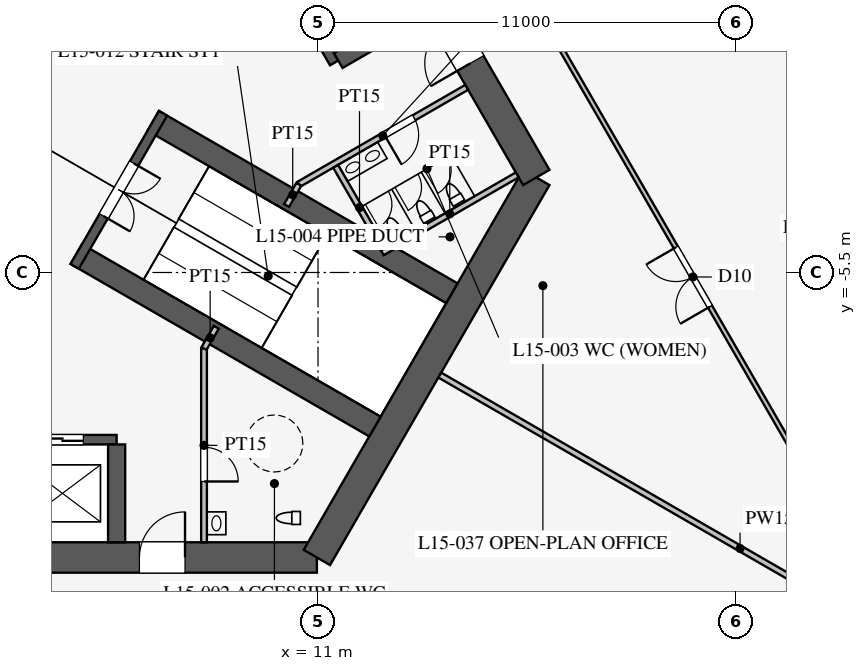
"""IFC4 building model, lengths in metres.
Left out: names, types, materials, properties, quantities, classifications, styles, units other than length and angle.
Written with IfcOpenShell. Run it as: python <this file> out.ifc"""

import sys

from ifc_helpers import new_model, si_unit, direction, frame, frame_2d, origin, place, context, subcontext, project, spatial, rectangle, extrude, element, fill, save


model = new_model("IFC4")
c1 = context("Model", 3, precision=1e-05, world=origin(), true_north=direction((0.0, 1.0)))
c2 = subcontext(c1, "Body", "Model", "MODEL_VIEW")
j1 = project(units=[si_unit("LENGTHUNIT", "METRE"), si_unit("PLANEANGLEUNIT", "RADIAN")], contexts=[c1])
p1 = place(None, origin())
s1 = spatial("IfcSite", under=j1, at=p1, CompositionType="ELEMENT")
p2 = place(p1, origin())
s2 = spatial("IfcBuilding", under=s1, at=p2, CompositionType="ELEMENT")
p3 = place(p2, frame((0.0, 0.0, 66.9)))
s3 = spatial("IfcBuildingStorey", under=s2, at=p3, CompositionType="ELEMENT", Elevation=66.9)
p4 = place(p3, frame((-10.97, -13.0, 0.0), z_axis=(0.0, 0.0, 1.0), x_axis=(1.0, 0.0, 0.0)))
e1 = element("IfcWall", 1, at=p4, inside=s3, PredefinedType="SHEAR", context=c2, shape_type="SweptSolid", body=[
    extrude(rectangle(XDim=21.939, YDim=0.8, at=frame_2d((10.97, 0.0))), origin(), (0.0, 0.0, 1.0), 4.2),
])
p5 = place(p4, frame((17.27, 0.0, 0.0)))
e2 = element("IfcOpeningElement", 2, at=p5, cuts=e1, PredefinedType="OPENING", context=c2, shape_type="SweptSolid", body=[
    extrude(rectangle(XDim=1.2, YDim=2.1, at=frame_2d((0.6, 1.05))), frame((0.0, 0.41, 0.0), z_axis=(0.0, -1.0, 0.0), x_axis=(1.0, 0.0, 0.0)), (0.0, 0.0, 1.0), 0.82),
])
p6 = place(p4, frame((3.47, 0.0, 0.0)))
e3 = element("IfcOpeningElement", 3, at=p6, cuts=e1, PredefinedType="OPENING", context=c2, shape_type="SweptSolid", body=[
    extrude(rectangle(XDim=1.2, YDim=2.1, at=frame_2d((0.6, 1.05))), frame((0.0, 0.41, 0.0), z_axis=(0.0, -1.0, 0.0), x_axis=(1.0, 0.0, 0.0)), (0.0, 0.0, 1.0), 0.82),
])
p7 = place(p3, frame((10.97, -13.0, 0.0), z_axis=(0.0, 0.0, 1.0), x_axis=(0.499995765644, 0.866027848477, 0.0)))
e4 = element("IfcWall", 4, at=p7, inside=s3, PredefinedType="SHEAR", context=c2, shape_type="SweptSolid", body=[
    extrude(rectangle(XDim=11.547, YDim=0.8, at=frame_2d((5.773, 0.0))), origin(), (0.0, 0.0, 1.0), 4.2),
])
p8 = place(p3, frame((16.743, -3.0, 0.0), z_axis=(0.0, 0.0, 1.0), x_axis=(-0.500002442456, 0.866023993627, 0.0)))
e5 = element("IfcWall", 5, at=p8, inside=s3, PredefinedType="SHEAR", context=c2, shape_type="SweptSolid", body=[
    extrude(rectangle(XDim=21.939, YDim=0.8, at=frame_2d((10.97, 0.0))), origin(), (0.0, 0.0, 1.0), 4.2),
])
p9 = place(p8, frame((17.27, 0.0, 0.0)))
e6 = element("IfcOpeningElement", 6, at=p9, cuts=e5, PredefinedType="OPENING", context=c2, shape_type="SweptSolid", body=[
    extrude(rectangle(XDim=1.2, YDim=2.1, at=frame_2d((0.6, 1.05))), frame((0.0, 0.41, 0.0), z_axis=(0.0, -1.0, 0.0), x_axis=(1.0, 0.0, 0.0)), (0.0, 0.0, 1.0), 0.82),
])
p10 = place(p8, frame((3.47, 0.0, 0.0)))
e7 = element("IfcOpeningElement", 7, at=p10, cuts=e5, PredefinedType="OPENING", context=c2, shape_type="SweptSolid", body=[
    extrude(rectangle(XDim=1.2, YDim=2.1, at=frame_2d((0.6, 1.05))), frame((0.0, 0.41, 0.0), z_axis=(0.0, -1.0, 0.0), x_axis=(1.0, 0.0, 0.0)), (0.0, 0.0, 1.0), 0.82),
])
p11 = place(p3, frame((-5.7, -9.9, 0.0), z_axis=(0.0, 0.0, 1.0), x_axis=(1.0, 0.0, 0.0)))
e8 = element("IfcWall", 8, at=p11, inside=s3, PredefinedType="SHEAR", context=c2, shape_type="SweptSolid", body=[
    extrude(rectangle(XDim=11.4, YDim=0.25, at=frame_2d((5.7, 0.0))), origin(), (0.0, 0.0, 1.0), 4.2),
])
p12 = place(p11, frame((0.875, 0.0, 0.0)))
e9 = element("IfcOpeningElement", 9, at=p12, cuts=e8, PredefinedType="OPENING", context=c2, shape_type="SweptSolid", body=[
    extrude(rectangle(XDim=1.1, YDim=2.2, at=frame_2d((0.55, 1.1))), frame((0.0, 0.135, 0.0), z_axis=(0.0, -1.0, 0.0), x_axis=(1.0, 0.0, 0.0)), (0.0, 0.0, 1.0), 0.27),
])
p13 = place(p11, frame((3.725, 0.0, 0.0)))
e10 = element("IfcOpeningElement", 10, at=p13, cuts=e8, PredefinedType="OPENING", context=c2, shape_type="SweptSolid", body=[
    extrude(rectangle(XDim=1.1, YDim=2.2, at=frame_2d((0.55, 1.1))), frame((0.0, 0.135, 0.0), z_axis=(0.0, -1.0, 0.0), x_axis=(1.0, 0.0, 0.0)), (0.0, 0.0, 1.0), 0.27),
])
p14 = place(p11, frame((6.575, 0.0, 0.0)))
e11 = element("IfcOpeningElement", 11, at=p14, cuts=e8, PredefinedType="OPENING", context=c2, shape_type="SweptSolid", body=[
    extrude(rectangle(XDim=1.1, YDim=2.2, at=frame_2d((0.55, 1.1))), frame((0.0, 0.135, 0.0), z_axis=(0.0, -1.0, 0.0), x_axis=(1.0, 0.0, 0.0)), (0.0, 0.0, 1.0), 0.27),
])
p15 = place(p11, frame((9.425, 0.0, 0.0)))
e12 = element("IfcOpeningElement", 12, at=p15, cuts=e8, PredefinedType="OPENING", context=c2, shape_type="SweptSolid", body=[
    extrude(rectangle(XDim=1.1, YDim=2.2, at=frame_2d((0.55, 1.1))), frame((0.0, 0.135, 0.0), z_axis=(0.0, -1.0, 0.0), x_axis=(1.0, 0.0, 0.0)), (0.0, 0.0, 1.0), 0.27),
])
p16 = place(p3, frame((5.7, -10.025, 0.0), z_axis=(0.0, 0.0, 1.0), x_axis=(0.0, -1.0, 0.0)))
e13 = element("IfcWall", 13, at=p16, inside=s3, PredefinedType="SHEAR", context=c2, shape_type="SweptSolid", body=[
    extrude(rectangle(XDim=2.575, YDim=0.45, at=frame_2d((1.288, 0.0))), origin(), (0.0, 0.0, 1.0), 4.2),
])
p17 = place(p3, frame((11.424, 0.014, 0.0), z_axis=(0.0, 0.0, 1.0), x_axis=(-0.500001763848, 0.866024385424, 0.0)))
e14 = element("IfcWall", 14, at=p17, inside=s3, PredefinedType="SHEAR", context=c2, shape_type="SweptSolid", body=[
    extrude(rectangle(XDim=11.4, YDim=0.25, at=frame_2d((5.7, 0.0))), origin(), (0.0, 0.0, 1.0), 4.2),
])
p18 = place(p3, frame((11.532, 0.076, 0.0), z_axis=(0.0, 0.0, 1.0), x_axis=(0.866005588531, 0.500034319456, 0.0)))
e15 = element("IfcWall", 15, at=p18, inside=s3, PredefinedType="SHEAR", context=c2, shape_type="SweptSolid", body=[
    extrude(rectangle(XDim=2.575, YDim=0.45, at=frame_2d((1.288, 0.0))), origin(), (0.0, 0.0, 1.0), 4.2),
])
for number, where, z_axis, x_axis in (
    (16, (4.638, -5.016, 0.0), (0.0, 0.0, 1.0), (0.866, -0.5, 0.0)),
    (17, (6.663, -1.509, 0.0), (0.0, 0.0, 1.0), (0.866, -0.5, 0.0)),
):
    element("IfcWall", number, at=place(p3, frame(where, z_axis=z_axis, x_axis=x_axis)), inside=s3, PredefinedType="SHEAR", context=c2, shape_type="SweptSolid", body=[
        extrude(rectangle(XDim=9.075, YDim=0.6, at=frame_2d((4.538, 0.0))), origin(), (0.0, 0.0, 1.0), 4.2),
    ])
p19 = place(p3, frame((4.597, -5.339, 0.0), z_axis=(0.0, 0.0, 1.0), x_axis=(0.499984536904, 0.866034331223, 0.0)))
e18 = element("IfcWall", 18, at=p19, inside=s3, PredefinedType="SHEAR", context=c2, shape_type="SweptSolid", body=[
    extrude(rectangle(XDim=4.65, YDim=0.25, at=frame_2d((2.325, 0.0))), origin(), (0.0, 0.0, 1.0), 4.2),
])
p20 = place(p19, frame((1.525, 0.0, 0.0)))
e19 = element("IfcOpeningElement", 19, at=p20, cuts=e18, PredefinedType="OPENING", context=c2, shape_type="SweptSolid", body=[
    extrude(rectangle(XDim=1.6, YDim=2.1, at=frame_2d((0.8, 1.05))), frame((0.0, 0.135, 0.0), z_axis=(0.0, -1.0, 0.0), x_axis=(1.0, 0.0, 0.0)), (0.0, 0.0, 1.0), 0.27),
])
p21 = place(p3, frame((8.0, -7.5, 0.0), z_axis=(0.0, 0.0, 1.0), x_axis=(0.0, -1.0, 0.0)))
e20 = element("IfcWall", 20, at=p21, inside=s3, PredefinedType="PARTITIONING", context=c2, shape_type="SweptSolid", body=[
    extrude(rectangle(XDim=5.1, YDim=0.15, at=frame_2d((2.55, 0.0))), origin(), (0.0, 0.0, 1.0), 4.0),
])
p22 = place(p21, frame((2.6, 0.0, 0.0)))
e21 = element("IfcOpeningElement", 21, at=p22, cuts=e20, PredefinedType="OPENING", context=c2, shape_type="SweptSolid", body=[
    extrude(rectangle(XDim=0.9, YDim=2.1, at=frame_2d((0.45, 1.05))), frame((0.0, 0.085, 0.0), z_axis=(0.0, -1.0, 0.0), x_axis=(1.0, 0.0, 0.0)), (0.0, 0.0, 1.0), 0.17),
])
p23 = place(p3, frame((10.495, -3.178, 0.0), z_axis=(0.0, 0.0, 1.0), x_axis=(0.86602216432, 0.500005610874, 0.0)))
e22 = element("IfcWall", 22, at=p23, inside=s3, PredefinedType="PARTITIONING", context=c2, shape_type="SweptSolid", body=[
    extrude(rectangle(XDim=5.1, YDim=0.15, at=frame_2d((2.55, 0.0))), origin(), (0.0, 0.0, 1.0), 4.0),
])
p24 = place(p23, frame((2.6, 0.0, 0.0)))
e23 = element("IfcOpeningElement", 23, at=p24, cuts=e22, PredefinedType="OPENING", context=c2, shape_type="SweptSolid", body=[
    extrude(rectangle(XDim=0.9, YDim=2.1, at=frame_2d((0.45, 1.05))), frame((0.0, 0.085, 0.0), z_axis=(0.0, -1.0, 0.0), x_axis=(1.0, 0.0, 0.0)), (0.0, 0.0, 1.0), 0.17),
])
for number, where, z_axis, x_axis in (
    (24, (8.0, -7.5, 0.0), (0.0, 0.0, 1.0), (0.5, 0.866, 0.0)),
    (25, (10.495, -3.178, 0.0), (0.0, 0.0, 1.0), (-0.5, -0.866, 0.0)),
):
    element("IfcWall", number, at=place(p3, frame(where, z_axis=z_axis, x_axis=x_axis)), inside=s3, PredefinedType="PARTITIONING", context=c2, shape_type="SweptSolid", body=[
        extrude(rectangle(XDim=0.645, YDim=0.15, at=frame_2d((0.323, 0.0))), origin(), (0.0, 0.0, 1.0), 4.0),
    ])
p25 = place(p3, frame((12.691, -4.982, 0.0), z_axis=(0.0, 0.0, 1.0), x_axis=(0.8660249478, 0.500000789788, 0.0)))
e26 = element("IfcWall", 26, at=p25, inside=s3, PredefinedType="PARTITIONING", context=c2, shape_type="SweptSolid", body=[
    extrude(rectangle(XDim=4.1, YDim=0.15, at=frame_2d((2.05, 0.0))), origin(), (0.0, 0.0, 1.0), 4.0),
])
p26 = place(p3, frame((11.464, -2.706, 0.0), z_axis=(0.0, 0.0, 1.0), x_axis=(0.50001992892, -0.866013897511, 0.0)))
e27 = element("IfcWall", 27, at=p26, inside=s3, PredefinedType="PARTITIONING", context=c2, shape_type="SweptSolid", body=[
    extrude(rectangle(XDim=2.51, YDim=0.15, at=frame_2d((1.255, 0.0))), origin(), (0.0, 0.0, 1.0), 4.0),
])
p27 = place(p3, frame((14.203, -8.2, 0.0), z_axis=(0.0, 0.0, 1.0), x_axis=(0.866024965723, -0.500000758745, 0.0)))
e28 = element("IfcWall", 28, at=p27, inside=s3, PredefinedType="PARTITIONING", context=c2, shape_type="SweptSolid", body=[
    extrude(rectangle(XDim=18.25, YDim=0.15, at=frame_2d((9.125, 0.0))), origin(), (0.0, 0.0, 1.0), 2.3),
])
p28 = place(p3, frame((26.415, -15.231, 0.0), z_axis=(0.0, 0.0, 1.0), x_axis=(-0.50000091641, 0.866024874695, 0.0)))
e29 = element("IfcWall", 29, at=p28, inside=s3, PredefinedType="PARTITIONING", context=c2, shape_type="SweptSolid", body=[
    extrude(rectangle(XDim=52.796, YDim=0.12, at=frame_2d((26.398, 0.0))), origin(), (0.0, 0.0, 1.0), 2.9),
])
p29 = place(p28, frame((10.2, 0.0, 0.15)))
e30 = element("IfcOpeningElement", 30, at=p29, cuts=e29, PredefinedType="OPENING", context=c2, shape_type="SweptSolid", body=[
    extrude(rectangle(XDim=1.8, YDim=2.1, at=frame_2d((0.9, 1.05))), frame((0.0, 0.07, 0.0), z_axis=(0.0, -1.0, 0.0), x_axis=(1.0, 0.0, 0.0)), (0.0, 0.0, 1.0), 0.14),
])
p30 = place(p28, frame((40.8, 0.0, 0.15)))
e31 = element("IfcOpeningElement", 31, at=p30, cuts=e29, PredefinedType="OPENING", context=c2, shape_type="SweptSolid", body=[
    extrude(rectangle(XDim=1.8, YDim=2.1, at=frame_2d((0.9, 1.05))), frame((0.0, 0.07, 0.0), z_axis=(0.0, -1.0, 0.0), x_axis=(1.0, 0.0, 0.0)), (0.0, 0.0, 1.0), 0.14),
])
p31 = place(p22, origin())
e32 = element("IfcDoor", 32, at=p31, inside=s3, OperationType="SINGLE_SWING_RIGHT", PredefinedType="DOOR", context=c2, shape_type="SweptSolid", body=[
    extrude(rectangle(XDim=0.9, YDim=2.1, at=frame_2d((0.45, 1.05))), frame((0.0, 0.025, 0.0), z_axis=(0.0, -1.0, 0.0), x_axis=(1.0, 0.0, 0.0)), (0.0, 0.0, 1.0), 0.05),
])
fill(e21, e32)
p32 = place(p24, frame((0.9, 0.0, 0.0), z_axis=(0.0, 0.0, 1.0), x_axis=(-1.0, 0.0, 0.0)))
e33 = element("IfcDoor", 33, at=p32, inside=s3, OperationType="SINGLE_SWING_RIGHT", PredefinedType="DOOR", context=c2, shape_type="SweptSolid", body=[
    extrude(rectangle(XDim=0.9, YDim=2.1, at=frame_2d((0.45, 1.05))), frame((0.0, 0.025, 0.0), z_axis=(0.0, -1.0, 0.0), x_axis=(1.0, 0.0, 0.0)), (0.0, 0.0, 1.0), 0.05),
])
fill(e23, e33)
p33 = place(p20, frame((1.6, 0.0, 0.0), z_axis=(0.0, 0.0, 1.0), x_axis=(-1.0, 0.0, 0.0)))
e34 = element("IfcDoor", 34, at=p33, inside=s3, OperationType="DOUBLE_DOOR_SINGLE_SWING", PredefinedType="DOOR", context=c2, shape_type="SweptSolid", body=[
    extrude(rectangle(XDim=1.6, YDim=2.1, at=frame_2d((0.8, 1.05))), frame((0.0, 0.025, 0.0), z_axis=(0.0, -1.0, 0.0), x_axis=(1.0, 0.0, 0.0)), (0.0, 0.0, 1.0), 0.05),
])
fill(e19, e34)
p34 = place(p5, origin())
e35 = element("IfcDoor", 35, at=p34, inside=s3, OperationType="SINGLE_SWING_RIGHT", PredefinedType="DOOR", context=c2, shape_type="SweptSolid", body=[
    extrude(rectangle(XDim=1.2, YDim=2.1, at=frame_2d((0.6, 1.05))), frame((0.0, 0.025, 0.0), z_axis=(0.0, -1.0, 0.0), x_axis=(1.0, 0.0, 0.0)), (0.0, 0.0, 1.0), 0.05),
])
fill(e2, e35)
p35 = place(p10, origin())
e36 = element("IfcDoor", 36, at=p35, inside=s3, OperationType="SINGLE_SWING_LEFT", PredefinedType="DOOR", context=c2, shape_type="SweptSolid", body=[
    extrude(rectangle(XDim=1.2, YDim=2.1, at=frame_2d((0.6, 1.05))), frame((0.0, 0.025, 0.0), z_axis=(0.0, -1.0, 0.0), x_axis=(1.0, 0.0, 0.0)), (0.0, 0.0, 1.0), 0.05),
])
fill(e7, e36)
p36 = place(p29, origin())
e37 = element("IfcDoor", 37, at=p36, inside=s3, OperationType="DOUBLE_DOOR_SINGLE_SWING", PredefinedType="DOOR", context=c2, shape_type="SweptSolid", body=[
    extrude(rectangle(XDim=1.8, YDim=2.1, at=frame_2d((0.9, 1.05))), frame((0.0, 0.025, 0.0), z_axis=(0.0, -1.0, 0.0), x_axis=(1.0, 0.0, 0.0)), (0.0, 0.0, 1.0), 0.05),
])
fill(e30, e37)
p37 = place(p15, origin())
e38 = element("IfcDoor", 38, at=p37, inside=s3, OperationType="DOUBLE_DOOR_SLIDING", PredefinedType="DOOR", context=c2, shape_type="SweptSolid", body=[
    extrude(rectangle(XDim=1.1, YDim=2.2, at=frame_2d((0.55, 1.1))), frame((0.0, 0.025, 0.0), z_axis=(0.0, -1.0, 0.0), x_axis=(1.0, 0.0, 0.0)), (0.0, 0.0, 1.0), 0.05),
])
fill(e12, e38)
save(model, sys.argv[1])
